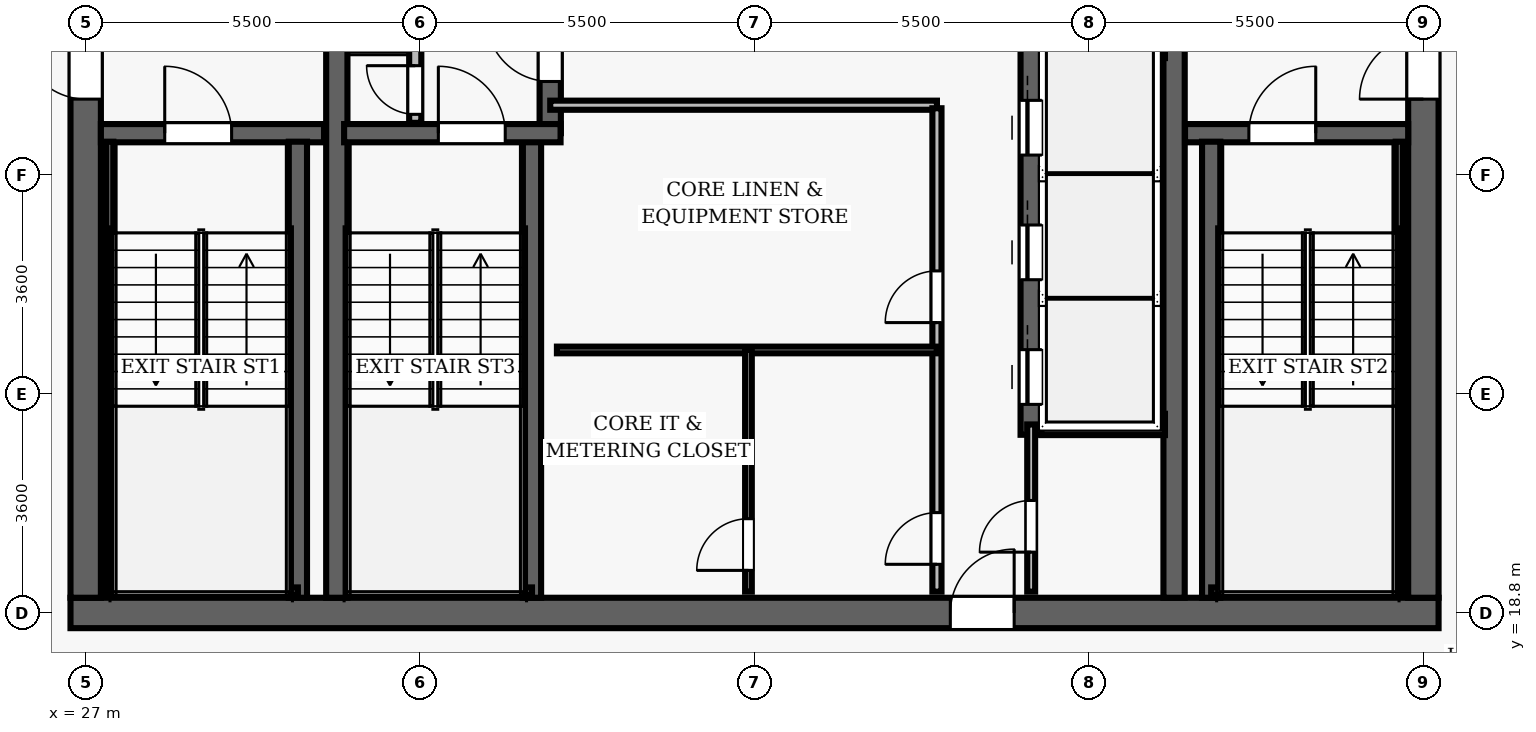
"""IFC4 building model, lengths in metres.
Left out: names, types, materials, properties, quantities, classifications, styles, units other than length and angle.
Written with IfcOpenShell. Run it as: python <this file> out.ifc"""

import sys

from ifc_helpers import new_model, si_unit, direction, frame, frame_2d, origin, place, context, subcontext, project, spatial, rectangle, extrude, element, fill, save


model = new_model("IFC4")
c1 = context("Model", 3, precision=1e-05, world=origin(), true_north=direction((0.0, 1.0)))
c2 = subcontext(c1, "Body", "Model", "MODEL_VIEW")
j1 = project(units=[si_unit("LENGTHUNIT", "METRE"), si_unit("PLANEANGLEUNIT", "RADIAN")], contexts=[c1])
p1 = place(None, origin())
s1 = spatial("IfcSite", under=j1, at=p1, CompositionType="ELEMENT")
p2 = place(p1, origin())
s2 = spatial("IfcBuilding", under=s1, at=p2, CompositionType="ELEMENT")
p3 = place(p2, frame((0.0, 0.0, 288.25)))
s3 = spatial("IfcBuildingStorey", under=s2, at=p3, CompositionType="ELEMENT", Elevation=288.25)
p4 = place(p3, frame((26.75, 18.8, 0.0), z_axis=(0.0, 0.0, 1.0), x_axis=(1.0, 0.0, 0.0)))
e1 = element("IfcWall", 1, at=p4, inside=s3, PredefinedType="SHEAR", context=c2, shape_type="SweptSolid", body=[
    extrude(rectangle(XDim=22.5, YDim=0.5, at=frame_2d((11.25, 0.0))), origin(), (0.0, 0.0, 1.0), 3.85),
])
p5 = place(p4, frame((14.47, 0.0, 0.0)))
e2 = element("IfcOpeningElement", 2, at=p5, cuts=e1, PredefinedType="OPENING", context=c2, shape_type="SweptSolid", body=[
    extrude(rectangle(XDim=1.05, YDim=2.15, at=frame_2d((0.525, 1.075))), frame((0.0, 0.26, 0.0), z_axis=(0.0, -1.0, 0.0), x_axis=(1.0, 0.0, 0.0)), (0.0, 0.0, 1.0), 0.52),
])
p6 = place(p3, frame((27.0, 19.05, 0.0), z_axis=(0.0, 0.0, 1.0), x_axis=(0.0, 1.0, 0.0)))
e3 = element("IfcWall", 3, at=p6, inside=s3, PredefinedType="SHEAR", context=c2, shape_type="SweptSolid", body=[
    extrude(rectangle(XDim=13.9, YDim=0.5, at=frame_2d((6.95, 0.0))), origin(), (0.0, 0.0, 1.0), 3.85),
])
p7 = place(p6, frame((8.2, 0.0, 0.0)))
e4 = element("IfcOpeningElement", 4, at=p7, cuts=e3, PredefinedType="OPENING", context=c2, shape_type="SweptSolid", body=[
    extrude(rectangle(XDim=1.05, YDim=2.15, at=frame_2d((0.525, 1.075))), frame((0.0, 0.26, 0.0), z_axis=(0.0, -1.0, 0.0), x_axis=(1.0, 0.0, 0.0)), (0.0, 0.0, 1.0), 0.52),
])
p8 = place(p3, frame((49.0, 19.05, 0.0), z_axis=(0.0, 0.0, 1.0), x_axis=(0.0, 1.0, 0.0)))
e5 = element("IfcWall", 5, at=p8, inside=s3, PredefinedType="SHEAR", context=c2, shape_type="SweptSolid", body=[
    extrude(rectangle(XDim=13.9, YDim=0.5, at=frame_2d((6.95, 0.0))), origin(), (0.0, 0.0, 1.0), 3.85),
])
p9 = place(p8, frame((8.2, 0.0, 0.0)))
e6 = element("IfcOpeningElement", 6, at=p9, cuts=e5, PredefinedType="OPENING", context=c2, shape_type="SweptSolid", body=[
    extrude(rectangle(XDim=1.05, YDim=2.15, at=frame_2d((0.525, 1.075))), frame((0.0, 0.26, 0.0), z_axis=(0.0, -1.0, 0.0), x_axis=(1.0, 0.0, 0.0)), (0.0, 0.0, 1.0), 0.52),
])
for number, where, z_axis, x_axis in (
    (7, (31.13, 19.05, 0.0), (0.0, 0.0, 1.0), (0.0, 1.0, 0.0)),
    (8, (44.9, 19.05, 0.0), (0.0, 0.0, 1.0), (0.0, 1.0, 0.0)),
):
    element("IfcWall", number, at=place(p3, frame(where, z_axis=z_axis, x_axis=x_axis)), inside=s3, PredefinedType="SHEAR", context=c2, shape_type="SweptSolid", body=[
        extrude(rectangle(XDim=13.9, YDim=0.35, at=frame_2d((6.95, 0.0))), origin(), (0.0, 0.0, 1.0), 3.85),
    ])
p10 = place(p3, frame((27.25, 26.69, 0.0), z_axis=(0.0, 0.0, 1.0), x_axis=(1.0, 0.0, 0.0)))
e9 = element("IfcWall", 9, at=p10, inside=s3, PredefinedType="SHEAR", context=c2, shape_type="SweptSolid", body=[
    extrude(rectangle(XDim=3.67, YDim=0.3, at=frame_2d((1.835, 0.0))), origin(), (0.0, 0.0, 1.0), 3.85),
])
p11 = place(p10, frame((1.05, 0.0, 0.0)))
e10 = element("IfcOpeningElement", 10, at=p11, cuts=e9, PredefinedType="OPENING", context=c2, shape_type="SweptSolid", body=[
    extrude(rectangle(XDim=1.1, YDim=2.15, at=frame_2d((0.55, 1.075))), frame((0.0, 0.16, 0.0), z_axis=(0.0, -1.0, 0.0), x_axis=(1.0, 0.0, 0.0)), (0.0, 0.0, 1.0), 0.32),
])
p12 = place(p3, frame((30.49, 19.05, 0.0), z_axis=(0.0, 0.0, 1.0), x_axis=(0.0, 1.0, 0.0)))
e11 = element("IfcWall", 11, at=p12, inside=s3, PredefinedType="SHEAR", context=c2, shape_type="SweptSolid", body=[
    extrude(rectangle(XDim=7.5, YDim=0.3, at=frame_2d((3.75, 0.0))), origin(), (0.0, 0.0, 1.0), 3.85),
])
p13 = place(p3, frame((27.395, 19.1, 0.0), z_axis=(0.0, 0.0, 1.0), x_axis=(0.0, 1.0, 0.0)))
e12 = element("IfcWall", 12, at=p13, inside=s3, PredefinedType="SHEAR", context=c2, shape_type="SweptSolid", body=[
    extrude(rectangle(XDim=7.45, YDim=0.12, at=frame_2d((3.725, 0.0))), origin(), (0.0, 0.0, 1.0), 3.85),
])
p14 = place(p3, frame((27.395, 19.16, 0.0), z_axis=(0.0, 0.0, 1.0), x_axis=(1.0, 0.0, 0.0)))
e13 = element("IfcWall", 13, at=p14, inside=s3, PredefinedType="SHEAR", context=c2, shape_type="SweptSolid", body=[
    extrude(rectangle(XDim=3.095, YDim=0.12, at=frame_2d((1.547, 0.0))), origin(), (0.0, 0.0, 1.0), 3.85),
])
p15 = place(p3, frame((45.08, 26.69, 0.0), z_axis=(0.0, 0.0, 1.0), x_axis=(1.0, 0.0, 0.0)))
e14 = element("IfcWall", 14, at=p15, inside=s3, PredefinedType="SHEAR", context=c2, shape_type="SweptSolid", body=[
    extrude(rectangle(XDim=3.67, YDim=0.3, at=frame_2d((1.835, 0.0))), origin(), (0.0, 0.0, 1.0), 3.85),
])
p16 = place(p15, frame((1.05, 0.0, 0.0)))
e15 = element("IfcOpeningElement", 15, at=p16, cuts=e14, PredefinedType="OPENING", context=c2, shape_type="SweptSolid", body=[
    extrude(rectangle(XDim=1.1, YDim=2.15, at=frame_2d((0.55, 1.075))), frame((0.0, 0.16, 0.0), z_axis=(0.0, -1.0, 0.0), x_axis=(1.0, 0.0, 0.0)), (0.0, 0.0, 1.0), 0.32),
])
p17 = place(p3, frame((45.51, 19.05, 0.0), z_axis=(0.0, 0.0, 1.0), x_axis=(0.0, 1.0, 0.0)))
e16 = element("IfcWall", 16, at=p17, inside=s3, PredefinedType="SHEAR", context=c2, shape_type="SweptSolid", body=[
    extrude(rectangle(XDim=7.5, YDim=0.3, at=frame_2d((3.75, 0.0))), origin(), (0.0, 0.0, 1.0), 3.85),
])
p18 = place(p3, frame((48.605, 19.1, 0.0), z_axis=(0.0, 0.0, 1.0), x_axis=(0.0, 1.0, 0.0)))
e17 = element("IfcWall", 17, at=p18, inside=s3, PredefinedType="SHEAR", context=c2, shape_type="SweptSolid", body=[
    extrude(rectangle(XDim=7.45, YDim=0.12, at=frame_2d((3.725, 0.0))), origin(), (0.0, 0.0, 1.0), 3.85),
])
p19 = place(p3, frame((45.51, 19.16, 0.0), z_axis=(0.0, 0.0, 1.0), x_axis=(1.0, 0.0, 0.0)))
e18 = element("IfcWall", 18, at=p19, inside=s3, PredefinedType="SHEAR", context=c2, shape_type="SweptSolid", body=[
    extrude(rectangle(XDim=3.095, YDim=0.12, at=frame_2d((1.547, 0.0))), origin(), (0.0, 0.0, 1.0), 3.85),
])
p20 = place(p3, frame((34.34, 19.05, 0.0), z_axis=(0.0, 0.0, 1.0), x_axis=(0.0, 1.0, 0.0)))
e19 = element("IfcWall", 19, at=p20, inside=s3, PredefinedType="SHEAR", context=c2, shape_type="SweptSolid", body=[
    extrude(rectangle(XDim=7.5, YDim=0.3, at=frame_2d((3.75, 0.0))), origin(), (0.0, 0.0, 1.0), 3.85),
])
p21 = place(p3, frame((34.64, 26.69, 0.0), z_axis=(0.0, 0.0, 1.0), x_axis=(0.0, 1.0, 0.0)))
e20 = element("IfcWall", 20, at=p21, inside=s3, PredefinedType="SHEAR", context=c2, shape_type="SweptSolid", body=[
    extrude(rectangle(XDim=6.26, YDim=0.35, at=frame_2d((3.13, 0.0))), origin(), (0.0, 0.0, 1.0), 3.85),
])
p22 = place(p21, frame((0.85, 0.0, 0.0)))
e21 = element("IfcOpeningElement", 21, at=p22, cuts=e20, PredefinedType="OPENING", context=c2, shape_type="SweptSolid", body=[
    extrude(rectangle(XDim=1.05, YDim=2.15, at=frame_2d((0.525, 1.075))), frame((0.0, 0.185, 0.0), z_axis=(0.0, -1.0, 0.0), x_axis=(1.0, 0.0, 0.0)), (0.0, 0.0, 1.0), 0.37),
])
p23 = place(p3, frame((31.25, 26.69, 0.0), z_axis=(0.0, 0.0, 1.0), x_axis=(1.0, 0.0, 0.0)))
e22 = element("IfcWall", 22, at=p23, inside=s3, PredefinedType="SHEAR", context=c2, shape_type="SweptSolid", body=[
    extrude(rectangle(XDim=3.56, YDim=0.3, at=frame_2d((1.78, 0.0))), origin(), (0.0, 0.0, 1.0), 3.85),
])
p24 = place(p23, frame((1.55, 0.0, 0.0)))
e23 = element("IfcOpeningElement", 23, at=p24, cuts=e22, PredefinedType="OPENING", context=c2, shape_type="SweptSolid", body=[
    extrude(rectangle(XDim=1.1, YDim=2.15, at=frame_2d((0.55, 1.075))), frame((0.0, 0.16, 0.0), z_axis=(0.0, -1.0, 0.0), x_axis=(1.0, 0.0, 0.0)), (0.0, 0.0, 1.0), 0.32),
])
p25 = place(p3, frame((31.3, 19.16, 0.0), z_axis=(0.0, 0.0, 1.0), x_axis=(1.0, 0.0, 0.0)))
e24 = element("IfcWall", 24, at=p25, inside=s3, PredefinedType="SHEAR", context=c2, shape_type="SweptSolid", body=[
    extrude(rectangle(XDim=3.04, YDim=0.12, at=frame_2d((1.52, 0.0))), origin(), (0.0, 0.0, 1.0), 3.85),
])
p26 = place(p3, frame((32.42, 26.86, 0.0), z_axis=(0.0, 0.0, 1.0), x_axis=(0.0, 1.0, 0.0)))
e25 = element("IfcWall", 25, at=p26, inside=s3, PredefinedType="PARTITIONING", context=c2, shape_type="SweptSolid", body=[
    extrude(rectangle(XDim=2.04, YDim=0.2, at=frame_2d((1.02, 0.0))), origin(), (0.0, 0.0, 1.0), 3.04),
])
p27 = place(p26, frame((0.14, 0.0, 0.0)))
e26 = element("IfcOpeningElement", 26, at=p27, cuts=e25, PredefinedType="OPENING", context=c2, shape_type="SweptSolid", body=[
    extrude(rectangle(XDim=0.8, YDim=2.05, at=frame_2d((0.4, 1.025))), frame((0.0, 0.11, 0.0), z_axis=(0.0, -1.0, 0.0), x_axis=(1.0, 0.0, 0.0)), (0.0, 0.0, 1.0), 0.22),
])
p28 = place(p3, frame((42.55, 21.73, 0.0), z_axis=(0.0, 0.0, 1.0), x_axis=(0.0, 1.0, 0.0)))
e27 = element("IfcWall", 27, at=p28, inside=s3, PredefinedType="SHEAR", context=c2, shape_type="SweptSolid", body=[
    extrude(rectangle(XDim=6.54, YDim=0.35, at=frame_2d((3.27, 0.0))), origin(), (0.0, 0.0, 1.0), 3.04),
])
p29 = place(p28, frame((0.5, 0.0, 0.0)))
e28 = element("IfcOpeningElement", 28, at=p29, cuts=e27, PredefinedType="OPENING", context=c2, shape_type="SweptSolid", body=[
    extrude(rectangle(XDim=0.9, YDim=2.15, at=frame_2d((0.45, 1.075))), frame((0.0, 0.185, 0.0), z_axis=(0.0, -1.0, 0.0), x_axis=(1.0, 0.0, 0.0)), (0.0, 0.0, 1.0), 0.37),
])
p30 = place(p28, frame((2.55, 0.0, 0.0)))
e29 = element("IfcOpeningElement", 29, at=p30, cuts=e27, PredefinedType="OPENING", context=c2, shape_type="SweptSolid", body=[
    extrude(rectangle(XDim=0.9, YDim=2.15, at=frame_2d((0.45, 1.075))), frame((0.0, 0.185, 0.0), z_axis=(0.0, -1.0, 0.0), x_axis=(1.0, 0.0, 0.0)), (0.0, 0.0, 1.0), 0.37),
])
p31 = place(p28, frame((4.6, 0.0, 0.0)))
e30 = element("IfcOpeningElement", 30, at=p31, cuts=e27, PredefinedType="OPENING", context=c2, shape_type="SweptSolid", body=[
    extrude(rectangle(XDim=0.9, YDim=2.15, at=frame_2d((0.45, 1.075))), frame((0.0, 0.185, 0.0), z_axis=(0.0, -1.0, 0.0), x_axis=(1.0, 0.0, 0.0)), (0.0, 0.0, 1.0), 0.37),
])
for number, where, z_axis, x_axis in (
    (31, (42.72, 21.9, 0.0), (0.0, 0.0, 1.0), (1.0, 0.0, 0.0)),
    (32, (42.72, 28.1, 0.0), (0.0, 0.0, 1.0), (1.0, 0.0, 0.0)),
):
    element("IfcWall", number, at=place(p3, frame(where, z_axis=z_axis, x_axis=x_axis)), inside=s3, PredefinedType="SHEAR", context=c2, shape_type="SweptSolid", body=[
        extrude(rectangle(XDim=2.03, YDim=0.35, at=frame_2d((1.015, 0.0))), origin(), (0.0, 0.0, 1.0), 3.04),
    ])
p32 = place(p3, frame((34.64, 27.15, 0.0), z_axis=(0.0, 0.0, 1.0), x_axis=(1.0, 0.0, 0.0)))
e33 = element("IfcWall", 33, at=p32, inside=s3, PredefinedType="PARTITIONING", context=c2, shape_type="SweptSolid", body=[
    extrude(rectangle(XDim=6.36, YDim=0.15, at=frame_2d((3.18, 0.0))), origin(), (0.0, 0.0, 1.0), 3.04),
])
p33 = place(p3, frame((41.0, 19.15, 0.0), z_axis=(0.0, 0.0, 1.0), x_axis=(0.0, 1.0, 0.0)))
e34 = element("IfcWall", 34, at=p33, inside=s3, PredefinedType="PARTITIONING", context=c2, shape_type="SweptSolid", body=[
    extrude(rectangle(XDim=7.95, YDim=0.15, at=frame_2d((3.975, 0.0))), origin(), (0.0, 0.0, 1.0), 3.04),
])
p34 = place(p33, frame((4.425, 0.0, 0.0)))
e35 = element("IfcOpeningElement", 35, at=p34, cuts=e34, PredefinedType="OPENING", context=c2, shape_type="SweptSolid", body=[
    extrude(rectangle(XDim=0.85, YDim=2.1, at=frame_2d((0.425, 1.05))), frame((0.0, 0.085, 0.0), z_axis=(0.0, -1.0, 0.0), x_axis=(1.0, 0.0, 0.0)), (0.0, 0.0, 1.0), 0.17),
])
p35 = place(p33, frame((0.45, 0.0, 0.0)))
e36 = element("IfcOpeningElement", 36, at=p35, cuts=e34, PredefinedType="OPENING", context=c2, shape_type="SweptSolid", body=[
    extrude(rectangle(XDim=0.85, YDim=2.1, at=frame_2d((0.425, 1.05))), frame((0.0, 0.085, 0.0), z_axis=(0.0, -1.0, 0.0), x_axis=(1.0, 0.0, 0.0)), (0.0, 0.0, 1.0), 0.17),
])
p36 = place(p3, frame((34.75, 23.125, 0.0), z_axis=(0.0, 0.0, 1.0), x_axis=(1.0, 0.0, 0.0)))
e37 = element("IfcWall", 37, at=p36, inside=s3, PredefinedType="PARTITIONING", context=c2, shape_type="SweptSolid", body=[
    extrude(rectangle(XDim=6.25, YDim=0.11, at=frame_2d((3.125, 0.0))), origin(), (0.0, 0.0, 1.0), 3.04),
])
p37 = place(p3, frame((37.9, 19.15, 0.0), z_axis=(0.0, 0.0, 1.0), x_axis=(0.0, 1.0, 0.0)))
e38 = element("IfcWall", 38, at=p37, inside=s3, PredefinedType="PARTITIONING", context=c2, shape_type="SweptSolid", body=[
    extrude(rectangle(XDim=3.975, YDim=0.11, at=frame_2d((1.988, 0.0))), origin(), (0.0, 0.0, 1.0), 3.04),
])
p38 = place(p37, frame((0.35, 0.0, 0.0)))
e39 = element("IfcOpeningElement", 39, at=p38, cuts=e38, PredefinedType="OPENING", context=c2, shape_type="SweptSolid", body=[
    extrude(rectangle(XDim=0.85, YDim=2.1, at=frame_2d((0.425, 1.05))), frame((0.0, 0.065, 0.0), z_axis=(0.0, -1.0, 0.0), x_axis=(1.0, 0.0, 0.0)), (0.0, 0.0, 1.0), 0.13),
])
p39 = place(p3, frame((42.55, 19.15, 0.0), z_axis=(0.0, 0.0, 1.0), x_axis=(0.0, 1.0, 0.0)))
e40 = element("IfcWall", 40, at=p39, inside=s3, PredefinedType="PARTITIONING", context=c2, shape_type="SweptSolid", body=[
    extrude(rectangle(XDim=2.75, YDim=0.13, at=frame_2d((1.375, 0.0))), origin(), (0.0, 0.0, 1.0), 3.04),
])
p40 = place(p39, frame((0.65, 0.0, 0.0)))
e41 = element("IfcOpeningElement", 41, at=p40, cuts=e40, PredefinedType="OPENING", context=c2, shape_type="SweptSolid", body=[
    extrude(rectangle(XDim=0.85, YDim=2.1, at=frame_2d((0.425, 1.05))), frame((0.0, 0.075, 0.0), z_axis=(0.0, -1.0, 0.0), x_axis=(1.0, 0.0, 0.0)), (0.0, 0.0, 1.0), 0.15),
])
p41 = place(p11, origin())
e42 = element("IfcDoor", 42, at=p41, inside=s3, OperationType="SINGLE_SWING_LEFT", PredefinedType="DOOR", context=c2, shape_type="SweptSolid", body=[
    extrude(rectangle(XDim=1.1, YDim=2.15, at=frame_2d((0.55, 1.075))), frame((0.0, 0.025, 0.0), z_axis=(0.0, -1.0, 0.0), x_axis=(1.0, 0.0, 0.0)), (0.0, 0.0, 1.0), 0.05),
])
fill(e10, e42)
p42 = place(p7, origin())
e43 = element("IfcDoor", 43, at=p42, inside=s3, OperationType="SINGLE_SWING_RIGHT", PredefinedType="DOOR", context=c2, shape_type="SweptSolid", body=[
    extrude(rectangle(XDim=1.05, YDim=2.15, at=frame_2d((0.525, 1.075))), frame((0.0, 0.025, 0.0), z_axis=(0.0, -1.0, 0.0), x_axis=(1.0, 0.0, 0.0)), (0.0, 0.0, 1.0), 0.05),
])
fill(e4, e43)
p43 = place(p16, origin())
e44 = element("IfcDoor", 44, at=p43, inside=s3, OperationType="SINGLE_SWING_RIGHT", PredefinedType="DOOR", context=c2, shape_type="SweptSolid", body=[
    extrude(rectangle(XDim=1.1, YDim=2.15, at=frame_2d((0.55, 1.075))), frame((0.0, 0.025, 0.0), z_axis=(0.0, -1.0, 0.0), x_axis=(1.0, 0.0, 0.0)), (0.0, 0.0, 1.0), 0.05),
])
fill(e15, e44)
p44 = place(p9, origin())
e45 = element("IfcDoor", 45, at=p44, inside=s3, OperationType="SINGLE_SWING_LEFT", PredefinedType="DOOR", context=c2, shape_type="SweptSolid", body=[
    extrude(rectangle(XDim=1.05, YDim=2.15, at=frame_2d((0.525, 1.075))), frame((0.0, 0.025, 0.0), z_axis=(0.0, -1.0, 0.0), x_axis=(1.0, 0.0, 0.0)), (0.0, 0.0, 1.0), 0.05),
])
fill(e6, e45)
p45 = place(p24, origin())
e46 = element("IfcDoor", 46, at=p45, inside=s3, OperationType="SINGLE_SWING_LEFT", PredefinedType="DOOR", context=c2, shape_type="SweptSolid", body=[
    extrude(rectangle(XDim=1.1, YDim=2.15, at=frame_2d((0.55, 1.075))), frame((0.0, 0.025, 0.0), z_axis=(0.0, -1.0, 0.0), x_axis=(1.0, 0.0, 0.0)), (0.0, 0.0, 1.0), 0.05),
])
fill(e23, e46)
p46 = place(p27, origin())
e47 = element("IfcDoor", 47, at=p46, inside=s3, OperationType="SINGLE_SWING_RIGHT", PredefinedType="DOOR", context=c2, shape_type="SweptSolid", body=[
    extrude(rectangle(XDim=0.8, YDim=2.05, at=frame_2d((0.4, 1.025))), frame((0.0, 0.025, 0.0), z_axis=(0.0, -1.0, 0.0), x_axis=(1.0, 0.0, 0.0)), (0.0, 0.0, 1.0), 0.05),
])
fill(e26, e47)
p47 = place(p5, origin())
e48 = element("IfcDoor", 48, at=p47, inside=s3, OperationType="SINGLE_SWING_RIGHT", PredefinedType="DOOR", context=c2, shape_type="SweptSolid", body=[
    extrude(rectangle(XDim=1.05, YDim=2.15, at=frame_2d((0.525, 1.075))), frame((0.0, 0.025, 0.0), z_axis=(0.0, -1.0, 0.0), x_axis=(1.0, 0.0, 0.0)), (0.0, 0.0, 1.0), 0.05),
])
fill(e2, e48)
p48 = place(p22, origin())
e49 = element("IfcDoor", 49, at=p48, inside=s3, OperationType="SINGLE_SWING_RIGHT", PredefinedType="DOOR", context=c2, shape_type="SweptSolid", body=[
    extrude(rectangle(XDim=1.05, YDim=2.15, at=frame_2d((0.525, 1.075))), frame((0.0, 0.025, 0.0), z_axis=(0.0, -1.0, 0.0), x_axis=(1.0, 0.0, 0.0)), (0.0, 0.0, 1.0), 0.05),
])
fill(e21, e49)
p49 = place(p34, origin())
e50 = element("IfcDoor", 50, at=p49, inside=s3, OperationType="SINGLE_SWING_LEFT", PredefinedType="DOOR", context=c2, shape_type="SweptSolid", body=[
    extrude(rectangle(XDim=0.85, YDim=2.1, at=frame_2d((0.425, 1.05))), frame((0.0, 0.025, 0.0), z_axis=(0.0, -1.0, 0.0), x_axis=(1.0, 0.0, 0.0)), (0.0, 0.0, 1.0), 0.05),
])
fill(e35, e50)
p50 = place(p35, origin())
e51 = element("IfcDoor", 51, at=p50, inside=s3, OperationType="SINGLE_SWING_LEFT", PredefinedType="DOOR", context=c2, shape_type="SweptSolid", body=[
    extrude(rectangle(XDim=0.85, YDim=2.1, at=frame_2d((0.425, 1.05))), frame((0.0, 0.025, 0.0), z_axis=(0.0, -1.0, 0.0), x_axis=(1.0, 0.0, 0.0)), (0.0, 0.0, 1.0), 0.05),
])
fill(e36, e51)
p51 = place(p38, origin())
e52 = element("IfcDoor", 52, at=p51, inside=s3, OperationType="SINGLE_SWING_LEFT", PredefinedType="DOOR", context=c2, shape_type="SweptSolid", body=[
    extrude(rectangle(XDim=0.85, YDim=2.1, at=frame_2d((0.425, 1.05))), frame((0.0, 0.025, 0.0), z_axis=(0.0, -1.0, 0.0), x_axis=(1.0, 0.0, 0.0)), (0.0, 0.0, 1.0), 0.05),
])
fill(e39, e52)
p52 = place(p40, origin())
e53 = element("IfcDoor", 53, at=p52, inside=s3, OperationType="SINGLE_SWING_LEFT", PredefinedType="DOOR", context=c2, shape_type="SweptSolid", body=[
    extrude(rectangle(XDim=0.85, YDim=2.1, at=frame_2d((0.425, 1.05))), frame((0.0, 0.025, 0.0), z_axis=(0.0, -1.0, 0.0), x_axis=(1.0, 0.0, 0.0)), (0.0, 0.0, 1.0), 0.05),
])
fill(e41, e53)
p53 = place(p29, origin())
e54 = element("IfcDoor", 54, at=p53, inside=s3, OperationType="SLIDING_TO_LEFT", PredefinedType="DOOR", context=c2, shape_type="SweptSolid", body=[
    extrude(rectangle(XDim=0.9, YDim=2.15, at=frame_2d((0.45, 1.075))), frame((0.0, 0.025, 0.0), z_axis=(0.0, -1.0, 0.0), x_axis=(1.0, 0.0, 0.0)), (0.0, 0.0, 1.0), 0.05),
])
fill(e28, e54)
p54 = place(p30, origin())
e55 = element("IfcDoor", 55, at=p54, inside=s3, OperationType="SLIDING_TO_LEFT", PredefinedType="DOOR", context=c2, shape_type="SweptSolid", body=[
    extrude(rectangle(XDim=0.9, YDim=2.15, at=frame_2d((0.45, 1.075))), frame((0.0, 0.025, 0.0), z_axis=(0.0, -1.0, 0.0), x_axis=(1.0, 0.0, 0.0)), (0.0, 0.0, 1.0), 0.05),
])
fill(e29, e55)
p55 = place(p31, origin())
e56 = element("IfcDoor", 56, at=p55, inside=s3, OperationType="SLIDING_TO_LEFT", PredefinedType="DOOR", context=c2, shape_type="SweptSolid", body=[
    extrude(rectangle(XDim=0.9, YDim=2.15, at=frame_2d((0.45, 1.075))), frame((0.0, 0.025, 0.0), z_axis=(0.0, -1.0, 0.0), x_axis=(1.0, 0.0, 0.0)), (0.0, 0.0, 1.0), 0.05),
])
fill(e30, e56)
save(model, sys.argv[1])
